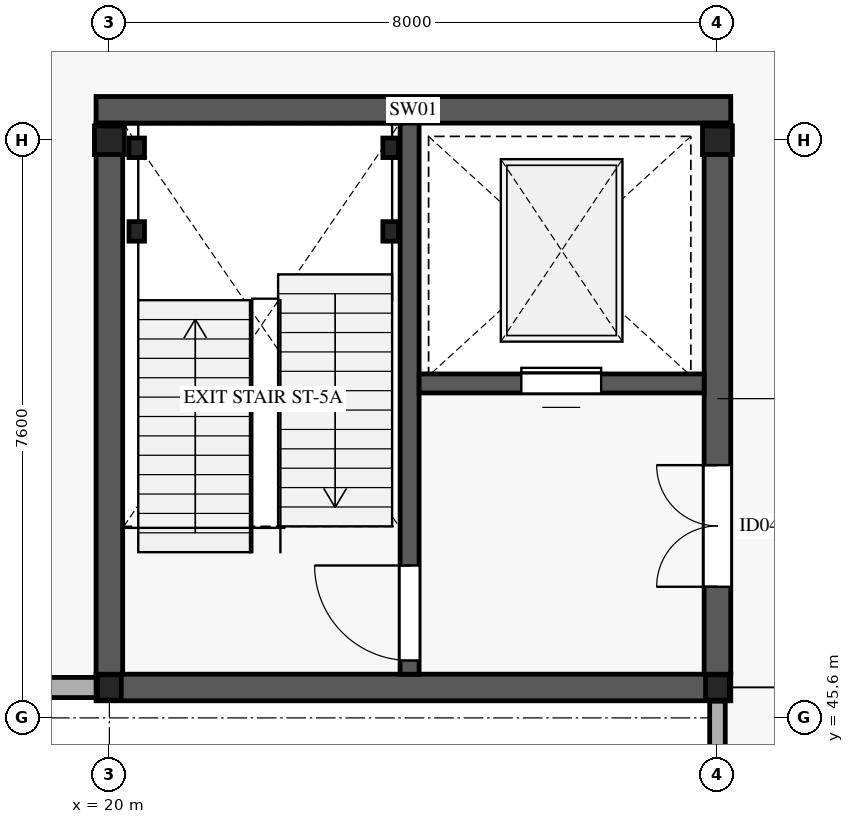
"""IFC4 building model, lengths in metres.
Left out: names, types, materials, properties, quantities, classifications, styles, units other than length and angle.
Written with IfcOpenShell. Run it as: python <this file> out.ifc"""

import sys

from ifc_helpers import new_model, si_unit, direction, frame, frame_2d, origin, origin_2d, place, context, subcontext, project, spatial, rectangle, i_section, extrude, element, fill, save


model = new_model("IFC4")
c1 = context("Model", 3, precision=1e-05, world=origin(), true_north=direction((0.0, 1.0)))
c2 = subcontext(c1, "Body", "Model", "MODEL_VIEW")
j1 = project(units=[si_unit("LENGTHUNIT", "METRE"), si_unit("PLANEANGLEUNIT", "RADIAN")], contexts=[c1])
p1 = place(None, origin())
s1 = spatial("IfcSite", under=j1, at=p1, CompositionType="ELEMENT")
p2 = place(p1, origin())
s2 = spatial("IfcBuilding", under=s1, at=p2, CompositionType="ELEMENT")
p3 = place(p2, frame((0.0, 0.0, 10.8)))
s3 = spatial("IfcBuildingStorey", under=s2, at=p3, CompositionType="ELEMENT", Elevation=10.8)
p4 = place(p3, frame((20.0, 46.0, 0.0), z_axis=(0.0, 0.0, 1.0), x_axis=(1.0, 0.0, 0.0)))
e1 = element("IfcColumn", 1, at=p4, inside=s3, PredefinedType="COLUMN", context=c2, shape_type="SweptSolid", body=[
    extrude(i_section(OverallWidth=0.313, OverallDepth=0.333, WebThickness=0.018, FlangeThickness=0.028, FilletRadius=0.015, at=origin_2d()), origin(), (0.0, 0.0, 1.0), 4.59),
])
p5 = place(p3, frame((20.0, 53.2, 0.0), z_axis=(0.0, 0.0, 1.0), x_axis=(1.0, 0.0, 0.0)))
e2 = element("IfcColumn", 2, at=p5, inside=s3, PredefinedType="COLUMN", context=c2, shape_type="SweptSolid", body=[
    extrude(i_section(OverallWidth=0.394, OverallDepth=0.376, WebThickness=0.017, FlangeThickness=0.028, FilletRadius=0.015, at=origin_2d()), origin(), (0.0, 0.0, 1.0), 4.59),
])
p6 = place(p3, frame((28.0, 46.0, 0.0), z_axis=(0.0, 0.0, 1.0), x_axis=(1.0, 0.0, 0.0)))
e3 = element("IfcColumn", 3, at=p6, inside=s3, PredefinedType="COLUMN", context=c2, shape_type="SweptSolid", body=[
    extrude(i_section(OverallWidth=0.313, OverallDepth=0.333, WebThickness=0.018, FlangeThickness=0.028, FilletRadius=0.015, at=origin_2d()), origin(), (0.0, 0.0, 1.0), 4.59),
])
p7 = place(p3, frame((28.0, 53.2, 0.0), z_axis=(0.0, 0.0, 1.0), x_axis=(1.0, 0.0, 0.0)))
e4 = element("IfcColumn", 4, at=p7, inside=s3, PredefinedType="COLUMN", context=c2, shape_type="SweptSolid", body=[
    extrude(i_section(OverallWidth=0.394, OverallDepth=0.376, WebThickness=0.017, FlangeThickness=0.028, FilletRadius=0.015, at=origin_2d()), origin(), (0.0, 0.0, 1.0), 4.59),
])
p8 = place(p3, frame((20.02, 46.0, 0.0), z_axis=(0.0, 0.0, 1.0), x_axis=(-1.0, 0.0, 0.0)))
e5 = element("IfcWall", 5, at=p8, inside=s3, PredefinedType="STANDARD", context=c2, shape_type="SweptSolid", body=[
    extrude(rectangle(XDim=8.04, YDim=0.265, at=frame_2d((4.02, 0.0))), origin(), (0.0, 0.0, 1.0), 3.66),
])
p9 = place(p8, frame((3.345, 0.0, 0.75)))
e6 = element("IfcOpeningElement", 6, at=p9, cuts=e5, PredefinedType="OPENING", context=c2, shape_type="SweptSolid", body=[
    extrude(rectangle(XDim=1.35, YDim=1.9, at=frame_2d((0.675, 0.95))), frame((0.0, 0.142, 0.0), z_axis=(0.0, -1.0, 0.0), x_axis=(1.0, 0.0, 0.0)), (0.0, 0.0, 1.0), 0.285),
])
p10 = place(p3, frame((28.0, 22.98, 0.0), z_axis=(0.0, 0.0, 1.0), x_axis=(0.0, 1.0, 0.0)))
e7 = element("IfcWall", 7, at=p10, inside=s3, PredefinedType="STANDARD", context=c2, shape_type="SweptSolid", body=[
    extrude(rectangle(XDim=22.84, YDim=0.205, at=frame_2d((11.42, 0.0))), origin(), (0.0, 0.0, 1.0), 4.02),
])
p11 = place(p10, frame((10.195, 0.0, 0.85)))
e8 = element("IfcOpeningElement", 8, at=p11, cuts=e7, PredefinedType="OPENING", context=c2, shape_type="SweptSolid", body=[
    extrude(rectangle(XDim=2.45, YDim=1.55, at=frame_2d((1.225, 0.775))), frame((0.0, 0.113, 0.0), z_axis=(0.0, -1.0, 0.0), x_axis=(1.0, 0.0, 0.0)), (0.0, 0.0, 1.0), 0.225),
])
for number, where, z_axis, x_axis in (
    (9, (19.825, 46.0, 0.0), (0.0, 0.0, 1.0), (1.0, 0.0, 0.0)),
    (10, (19.825, 53.6, 0.0), (0.0, 0.0, 1.0), (1.0, 0.0, 0.0)),
):
    element("IfcWall", number, at=place(p3, frame(where, z_axis=z_axis, x_axis=x_axis)), inside=s3, PredefinedType="SHEAR", context=c2, shape_type="SweptSolid", body=[
        extrude(rectangle(XDim=8.35, YDim=0.35, at=frame_2d((4.175, 0.0))), origin(), (0.0, 0.0, 1.0), 4.59),
    ])
p12 = place(p3, frame((20.0, 46.175, 0.0), z_axis=(0.0, 0.0, 1.0), x_axis=(0.0, 1.0, 0.0)))
e11 = element("IfcWall", 11, at=p12, inside=s3, PredefinedType="SHEAR", context=c2, shape_type="SweptSolid", body=[
    extrude(rectangle(XDim=7.25, YDim=0.35, at=frame_2d((3.625, 0.0))), origin(), (0.0, 0.0, 1.0), 4.59),
])
p13 = place(p3, frame((28.0, 46.175, 0.0), z_axis=(0.0, 0.0, 1.0), x_axis=(0.0, 1.0, 0.0)))
e12 = element("IfcWall", 12, at=p13, inside=s3, PredefinedType="SHEAR", context=c2, shape_type="SweptSolid", body=[
    extrude(rectangle(XDim=7.25, YDim=0.35, at=frame_2d((3.625, 0.0))), origin(), (0.0, 0.0, 1.0), 4.59),
])
p14 = place(p13, frame((1.15, 0.0, 0.0)))
e13 = element("IfcOpeningElement", 13, at=p14, cuts=e12, PredefinedType="OPENING", context=c2, shape_type="SweptSolid", body=[
    extrude(rectangle(XDim=1.6, YDim=2.35, at=frame_2d((0.8, 1.175))), frame((0.0, 0.185, 0.0), z_axis=(0.0, -1.0, 0.0), x_axis=(1.0, 0.0, 0.0)), (0.0, 0.0, 1.0), 0.37),
])
p15 = place(p3, frame((23.95, 46.175, 0.0), z_axis=(0.0, 0.0, 1.0), x_axis=(0.0, 1.0, 0.0)))
e14 = element("IfcWall", 14, at=p15, inside=s3, PredefinedType="SHEAR", context=c2, shape_type="SweptSolid", body=[
    extrude(rectangle(XDim=7.25, YDim=0.25, at=frame_2d((3.625, 0.0))), origin(), (0.0, 0.0, 1.0), 4.59),
])
p16 = place(p15, frame((0.18, 0.0, 0.0)))
e15 = element("IfcOpeningElement", 15, at=p16, cuts=e14, PredefinedType="OPENING", context=c2, shape_type="SweptSolid", body=[
    extrude(rectangle(XDim=1.25, YDim=2.2, at=frame_2d((0.625, 1.1))), frame((0.0, 0.135, 0.0), z_axis=(0.0, -1.0, 0.0), x_axis=(1.0, 0.0, 0.0)), (0.0, 0.0, 1.0), 0.27),
])
p17 = place(p3, frame((24.075, 50.0, 0.0), z_axis=(0.0, 0.0, 1.0), x_axis=(1.0, 0.0, 0.0)))
e16 = element("IfcWall", 16, at=p17, inside=s3, PredefinedType="SHEAR", context=c2, shape_type="SweptSolid", body=[
    extrude(rectangle(XDim=3.75, YDim=0.25, at=frame_2d((1.875, 0.0))), origin(), (0.0, 0.0, 1.0), 4.59),
])
p18 = place(p17, frame((1.345, 0.0, 0.0)))
e17 = element("IfcOpeningElement", 17, at=p18, cuts=e16, PredefinedType="OPENING", context=c2, shape_type="SweptSolid", body=[
    extrude(rectangle(XDim=1.05, YDim=2.2, at=frame_2d((0.525, 1.1))), frame((0.0, 0.135, 0.0), z_axis=(0.0, -1.0, 0.0), x_axis=(1.0, 0.0, 0.0)), (0.0, 0.0, 1.0), 0.27),
])
for number, where, z_axis, x_axis in (
    (18, (20.36, 52.0, 0.0), (0.0, 0.0, 1.0), (1.0, 0.0, 0.0)),
    (19, (23.7, 52.0, 0.0), (0.0, 0.0, 1.0), (1.0, 0.0, 0.0)),
    (20, (20.36, 53.1, 0.0), (0.0, 0.0, 1.0), (1.0, 0.0, 0.0)),
    (21, (23.7, 53.1, 0.0), (0.0, 0.0, 1.0), (1.0, 0.0, 0.0)),
):
    element("IfcColumn", number, at=place(p3, frame(where, z_axis=z_axis, x_axis=x_axis)), inside=s3, PredefinedType="COLUMN", context=c2, shape_type="SweptSolid", body=[
        extrude(i_section(OverallWidth=0.204, OverallDepth=0.257, WebThickness=0.009, FlangeThickness=0.016, FilletRadius=0.013, at=origin_2d()), origin(), (0.0, 0.0, 1.0), 4.795),
    ])
p19 = place(p16, origin())
e22 = element("IfcDoor", 22, at=p19, inside=s3, OperationType="SINGLE_SWING_RIGHT", PredefinedType="DOOR", context=c2, shape_type="SweptSolid", body=[
    extrude(rectangle(XDim=1.25, YDim=2.2, at=frame_2d((0.625, 1.1))), frame((0.0, 0.025, 0.0), z_axis=(0.0, -1.0, 0.0), x_axis=(1.0, 0.0, 0.0)), (0.0, 0.0, 1.0), 0.05),
])
fill(e15, e22)
p20 = place(p14, origin())
e23 = element("IfcDoor", 23, at=p20, inside=s3, OperationType="DOUBLE_DOOR_SINGLE_SWING", PredefinedType="DOOR", context=c2, shape_type="SweptSolid", body=[
    extrude(rectangle(XDim=1.6, YDim=2.35, at=frame_2d((0.8, 1.175))), frame((0.0, 0.025, 0.0), z_axis=(0.0, -1.0, 0.0), x_axis=(1.0, 0.0, 0.0)), (0.0, 0.0, 1.0), 0.05),
])
fill(e13, e23)
p21 = place(p18, origin())
e24 = element("IfcDoor", 24, at=p21, inside=s3, OperationType="SLIDING_TO_RIGHT", PredefinedType="DOOR", context=c2, shape_type="SweptSolid", body=[
    extrude(rectangle(XDim=1.05, YDim=2.2, at=frame_2d((0.525, 1.1))), frame((0.0, 0.025, 0.0), z_axis=(0.0, -1.0, 0.0), x_axis=(1.0, 0.0, 0.0)), (0.0, 0.0, 1.0), 0.05),
])
fill(e17, e24)
save(model, sys.argv[1])
